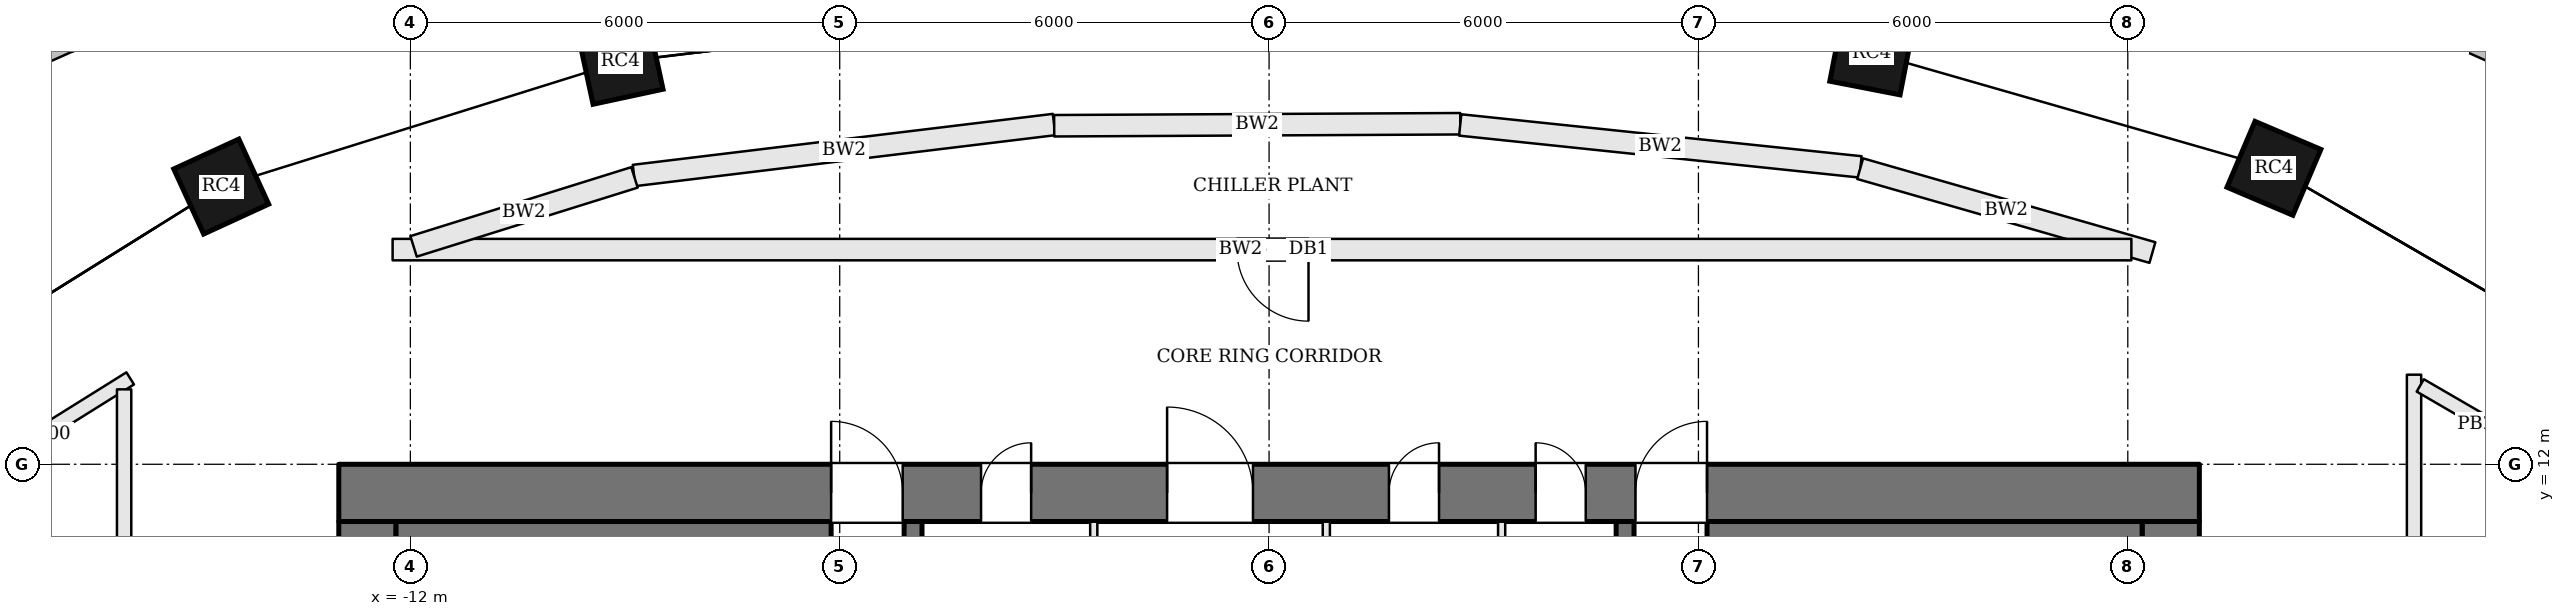
"""IFC4 building model, lengths in metres.
Left out: names, types, materials, properties, quantities, classifications, styles, units other than length and angle.
Written with IfcOpenShell. Run it as: python <this file> out.ifc"""

import sys

from ifc_helpers import new_model, si_unit, direction, frame, frame_2d, origin, origin_2d, place, context, subcontext, project, spatial, rectangle, extrude, element, fill, save


model = new_model("IFC4")
c1 = context("Model", 3, precision=1e-05, world=origin(), true_north=direction((0.0, 1.0)))
c2 = subcontext(c1, "Body", "Model", "MODEL_VIEW")
j1 = project(units=[si_unit("LENGTHUNIT", "METRE"), si_unit("PLANEANGLEUNIT", "RADIAN")], contexts=[c1])
p1 = place(None, origin())
s1 = spatial("IfcSite", under=j1, at=p1, CompositionType="ELEMENT")
p2 = place(p1, origin())
s2 = spatial("IfcBuilding", under=s1, at=p2, CompositionType="ELEMENT")
p3 = place(p2, frame((0.0, 0.0, 216.9)))
s3 = spatial("IfcBuildingStorey", under=s2, at=p3, CompositionType="ELEMENT", Elevation=216.9)
p4 = place(p3, frame((-13.0, 11.6, 0.0), z_axis=(0.0, 0.0, 1.0), x_axis=(1.0, 0.0, 0.0)))
e1 = element("IfcWall", 1, at=p4, inside=s3, PredefinedType="SHEAR", context=c2, shape_type="SweptSolid", body=[
    extrude(rectangle(XDim=26.0, YDim=0.8, at=frame_2d((13.0, 0.0))), origin(), (0.0, 0.0, 1.0), 4.5),
])
p5 = place(p4, frame((8.975, 0.0, 0.0)))
e2 = element("IfcOpeningElement", 2, at=p5, cuts=e1, PredefinedType="OPENING", context=c2, shape_type="SweptSolid", body=[
    extrude(rectangle(XDim=0.7, YDim=2.1, at=frame_2d((0.35, 1.05))), frame((0.0, 0.41, 0.0), z_axis=(0.0, -1.0, 0.0), x_axis=(1.0, 0.0, 0.0)), (0.0, 0.0, 1.0), 0.82),
])
p6 = place(p4, frame((11.575, 0.0, 0.0)))
e3 = element("IfcOpeningElement", 3, at=p6, cuts=e1, PredefinedType="OPENING", context=c2, shape_type="SweptSolid", body=[
    extrude(rectangle(XDim=1.2, YDim=2.1, at=frame_2d((0.6, 1.05))), frame((0.0, 0.41, 0.0), z_axis=(0.0, -1.0, 0.0), x_axis=(1.0, 0.0, 0.0)), (0.0, 0.0, 1.0), 0.82),
])
p7 = place(p4, frame((14.675, 0.0, 0.0)))
e4 = element("IfcOpeningElement", 4, at=p7, cuts=e1, PredefinedType="OPENING", context=c2, shape_type="SweptSolid", body=[
    extrude(rectangle(XDim=0.7, YDim=2.1, at=frame_2d((0.35, 1.05))), frame((0.0, 0.41, 0.0), z_axis=(0.0, -1.0, 0.0), x_axis=(1.0, 0.0, 0.0)), (0.0, 0.0, 1.0), 0.82),
])
p8 = place(p4, frame((16.725, 0.0, 0.0)))
e5 = element("IfcOpeningElement", 5, at=p8, cuts=e1, PredefinedType="OPENING", context=c2, shape_type="SweptSolid", body=[
    extrude(rectangle(XDim=0.7, YDim=2.1, at=frame_2d((0.35, 1.05))), frame((0.0, 0.41, 0.0), z_axis=(0.0, -1.0, 0.0), x_axis=(1.0, 0.0, 0.0)), (0.0, 0.0, 1.0), 0.82),
])
p9 = place(p4, frame((6.88, 0.0, 0.0)))
e6 = element("IfcOpeningElement", 6, at=p9, cuts=e1, PredefinedType="OPENING", context=c2, shape_type="SweptSolid", body=[
    extrude(rectangle(XDim=1.0, YDim=2.1, at=frame_2d((0.5, 1.05))), frame((0.0, 0.41, 0.0), z_axis=(0.0, -1.0, 0.0), x_axis=(1.0, 0.0, 0.0)), (0.0, 0.0, 1.0), 0.82),
])
p10 = place(p4, frame((18.12, 0.0, 0.0)))
e7 = element("IfcOpeningElement", 7, at=p10, cuts=e1, PredefinedType="OPENING", context=c2, shape_type="SweptSolid", body=[
    extrude(rectangle(XDim=1.0, YDim=2.1, at=frame_2d((0.5, 1.05))), frame((0.0, 0.41, 0.0), z_axis=(0.0, -1.0, 0.0), x_axis=(1.0, 0.0, 0.0)), (0.0, 0.0, 1.0), 0.82),
])
p11 = place(p3, frame((12.6, -2.2, 0.0), z_axis=(0.0, 0.0, 1.0), x_axis=(0.0, 1.0, 0.0)))
e8 = element("IfcWall", 8, at=p11, inside=s3, PredefinedType="SHEAR", context=c2, shape_type="SweptSolid", body=[
    extrude(rectangle(XDim=13.4, YDim=0.8, at=frame_2d((6.7, 0.0))), origin(), (0.0, 0.0, 1.0), 4.5),
])
p12 = place(p11, frame((7.4, 0.0, 0.0)))
e9 = element("IfcOpeningElement", 9, at=p12, cuts=e8, PredefinedType="OPENING", context=c2, shape_type="SweptSolid", body=[
    extrude(rectangle(XDim=1.8, YDim=2.1, at=frame_2d((0.9, 1.05))), frame((0.0, 0.41, 0.0), z_axis=(0.0, -1.0, 0.0), x_axis=(1.0, 0.0, 0.0)), (0.0, 0.0, 1.0), 0.82),
])
p13 = place(p3, frame((-12.6, -2.2, 0.0), z_axis=(0.0, 0.0, 1.0), x_axis=(0.0, 1.0, 0.0)))
e10 = element("IfcWall", 10, at=p13, inside=s3, PredefinedType="SHEAR", context=c2, shape_type="SweptSolid", body=[
    extrude(rectangle(XDim=13.4, YDim=0.8, at=frame_2d((6.7, 0.0))), origin(), (0.0, 0.0, 1.0), 4.5),
])
p14 = place(p13, frame((4.2, 0.0, 0.0)))
e11 = element("IfcOpeningElement", 11, at=p14, cuts=e10, PredefinedType="OPENING", context=c2, shape_type="SweptSolid", body=[
    extrude(rectangle(XDim=1.8, YDim=2.1, at=frame_2d((0.9, 1.05))), frame((0.0, 0.41, 0.0), z_axis=(0.0, -1.0, 0.0), x_axis=(1.0, 0.0, 0.0)), (0.0, 0.0, 1.0), 0.82),
])
for number, where, z_axis, x_axis in (
    (12, (14.042, 16.136, 0.0), (0.0, 0.0, 1.0), (-0.92, 0.392, 0.0)),
    (13, (8.422, 17.749, 0.0), (0.0, 0.0, 1.0), (-0.982, 0.191, 0.0)),
    (14, (-9.063, 17.625, 0.0), (0.0, 0.0, 1.0), (-0.978, -0.21, 0.0)),
    (15, (-14.643, 15.881, 0.0), (0.0, 0.0, 1.0), (-0.909, -0.417, 0.0)),
):
    element("IfcColumn", number, at=place(p3, frame(where, z_axis=z_axis, x_axis=x_axis)), inside=s3, PredefinedType="COLUMN", context=c2, shape_type="SweptSolid", body=[
        extrude(rectangle(XDim=1.0, YDim=1.0, at=origin_2d()), origin(), (0.0, 0.0, 1.0), 4.5),
    ])
p15 = place(p3, frame((17.693, 17.58, 0.0), z_axis=(0.0, 0.0, 1.0), x_axis=(-0.912580432801, 0.408897240966, 0.0)))
e16 = element("IfcWall", 16, at=p15, inside=s3, PredefinedType="SOLIDWALL", context=c2, shape_type="SweptSolid", body=[
    extrude(rectangle(XDim=4.021, YDim=0.45, at=frame_2d((2.01, 0.0))), origin(), (0.0, 0.0, 1.0), 4.3),
])
p16 = place(p15, frame((0.96, 0.0, 1.2)))
e17 = element("IfcOpeningElement", 17, at=p16, cuts=e16, PredefinedType="OPENING", context=c2, shape_type="SweptSolid", body=[
    extrude(rectangle(XDim=2.1, YDim=1.8, at=frame_2d((1.05, 0.9))), frame((0.0, 0.235, 0.0), z_axis=(0.0, -1.0, 0.0), x_axis=(1.0, 0.0, 0.0)), (0.0, 0.0, 1.0), 0.47),
])
p17 = place(p3, frame((-14.024, 19.224, 0.0), z_axis=(0.0, 0.0, 1.0), x_axis=(-0.912580432801, -0.408897240966, 0.0)))
e18 = element("IfcWall", 18, at=p17, inside=s3, PredefinedType="SOLIDWALL", context=c2, shape_type="SweptSolid", body=[
    extrude(rectangle(XDim=4.021, YDim=0.45, at=frame_2d((2.01, 0.0))), origin(), (0.0, 0.0, 1.0), 4.3),
])
p18 = place(p17, frame((0.96, 0.0, 1.2)))
e19 = element("IfcOpeningElement", 19, at=p18, cuts=e18, PredefinedType="OPENING", context=c2, shape_type="SweptSolid", body=[
    extrude(rectangle(XDim=2.1, YDim=1.8, at=frame_2d((1.05, 0.9))), frame((0.0, 0.235, 0.0), z_axis=(0.0, -1.0, 0.0), x_axis=(1.0, 0.0, 0.0)), (0.0, 0.0, 1.0), 0.47),
])
p19 = place(p3, frame((-4.975, -2.2, 0.0), z_axis=(0.0, 0.0, 1.0), x_axis=(0.0, 1.0, 0.0)))
e20 = element("IfcWall", 20, at=p19, inside=s3, PredefinedType="SOLIDWALL", context=c2, shape_type="SweptSolid", body=[
    extrude(rectangle(XDim=13.4, YDim=0.25, at=frame_2d((6.7, 0.0))), origin(), (0.0, 0.0, 1.0), 4.3),
])
p20 = place(p19, frame((5.25, 0.0, 0.0)))
e21 = element("IfcOpeningElement", 21, at=p20, cuts=e20, PredefinedType="OPENING", context=c2, shape_type="SweptSolid", body=[
    extrude(rectangle(XDim=1.2, YDim=2.1, at=frame_2d((0.6, 1.05))), frame((0.0, 0.135, 0.0), z_axis=(0.0, -1.0, 0.0), x_axis=(1.0, 0.0, 0.0)), (0.0, 0.0, 1.0), 0.27),
])
p21 = place(p3, frame((4.975, 11.2, 0.0), z_axis=(0.0, 0.0, 1.0), x_axis=(0.0, -1.0, 0.0)))
e22 = element("IfcWall", 22, at=p21, inside=s3, PredefinedType="SOLIDWALL", context=c2, shape_type="SweptSolid", body=[
    extrude(rectangle(XDim=13.4, YDim=0.25, at=frame_2d((6.7, 0.0))), origin(), (0.0, 0.0, 1.0), 4.3),
])
p22 = place(p21, frame((5.25, 0.0, 0.0)))
e23 = element("IfcOpeningElement", 23, at=p22, cuts=e22, PredefinedType="OPENING", context=c2, shape_type="SweptSolid", body=[
    extrude(rectangle(XDim=1.2, YDim=2.1, at=frame_2d((0.6, 1.05))), frame((0.0, 0.135, 0.0), z_axis=(0.0, -1.0, 0.0), x_axis=(1.0, 0.0, 0.0)), (0.0, 0.0, 1.0), 0.27),
])
for number, where, z_axis, x_axis in (
    (24, (-12.2, 10.9, 0.0), (0.0, 0.0, 1.0), (1.0, 0.0, 0.0)),
    (25, (12.2, 10.9, 0.0), (0.0, 0.0, 1.0), (-1.0, 0.0, 0.0)),
):
    element("IfcWall", number, at=place(p3, frame(where, z_axis=z_axis, x_axis=x_axis)), inside=s3, PredefinedType="SOLIDWALL", context=c2, shape_type="SweptSolid", body=[
        extrude(rectangle(XDim=6.08, YDim=0.6, at=frame_2d((3.04, 0.0))), origin(), (0.0, 0.0, 1.0), 4.3),
    ])
for number, where, z_axis, x_axis in (
    (26, (-2.45, 8.6, 0.0), (0.0, 0.0, 1.0), (0.0, 1.0, 0.0)),
    (27, (0.8, 8.6, 0.0), (0.0, 0.0, 1.0), (0.0, 1.0, 0.0)),
    (28, (3.25, 8.6, 0.0), (0.0, 0.0, 1.0), (0.0, 1.0, 0.0)),
):
    element("IfcWall", number, at=place(p3, frame(where, z_axis=z_axis, x_axis=x_axis)), inside=s3, PredefinedType="PARTITIONING", context=c2, shape_type="SweptSolid", body=[
        extrude(rectangle(XDim=2.6, YDim=0.1, at=frame_2d((1.3, 0.0))), origin(), (0.0, 0.0, 1.0), 4.3),
    ])
p23 = place(p3, frame((-18.422, 11.635, 0.0), z_axis=(0.0, 0.0, 1.0), x_axis=(0.848299824463, 0.529516201656, 0.0)))
e29 = element("IfcWall", 29, at=p23, inside=s3, PredefinedType="PARTITIONING", context=c2, shape_type="SweptSolid", body=[
    extrude(rectangle(XDim=2.955, YDim=0.2, at=frame_2d((1.478, 0.0))), origin(), (0.0, 0.0, 1.0), 4.3),
])
p24 = place(p3, frame((-16.0, 13.047, 0.0), z_axis=(0.0, 0.0, 1.0), x_axis=(0.0, -1.0, 0.0)))
e30 = element("IfcWall", 30, at=p24, inside=s3, PredefinedType="PARTITIONING", context=c2, shape_type="SweptSolid", body=[
    extrude(rectangle(XDim=19.147, YDim=0.2, at=frame_2d((9.574, 0.0))), origin(), (0.0, 0.0, 1.0), 4.3),
])
p25 = place(p24, frame((7.647, 0.0, 0.0)))
e31 = element("IfcOpeningElement", 31, at=p25, cuts=e30, PredefinedType="OPENING", context=c2, shape_type="SweptSolid", body=[
    extrude(rectangle(XDim=1.8, YDim=2.1, at=frame_2d((0.9, 1.05))), frame((0.0, 0.11, 0.0), z_axis=(0.0, -1.0, 0.0), x_axis=(1.0, 0.0, 0.0)), (0.0, 0.0, 1.0), 0.22),
])
p26 = place(p3, frame((16.0, -5.9, 0.0), z_axis=(0.0, 0.0, 1.0), x_axis=(0.0, 1.0, 0.0)))
e32 = element("IfcWall", 32, at=p26, inside=s3, PredefinedType="PARTITIONING", context=c2, shape_type="SweptSolid", body=[
    extrude(rectangle(XDim=19.152, YDim=0.2, at=frame_2d((9.576, 0.0))), origin(), (0.0, 0.0, 1.0), 4.3),
])
p27 = place(p26, frame((9.5, 0.0, 0.0)))
e33 = element("IfcOpeningElement", 33, at=p27, cuts=e32, PredefinedType="OPENING", context=c2, shape_type="SweptSolid", body=[
    extrude(rectangle(XDim=1.8, YDim=2.1, at=frame_2d((0.9, 1.05))), frame((0.0, 0.11, 0.0), z_axis=(0.0, -1.0, 0.0), x_axis=(1.0, 0.0, 0.0)), (0.0, 0.0, 1.0), 0.22),
])
p28 = place(p3, frame((16.087, 13.102, 0.0), z_axis=(0.0, 0.0, 1.0), x_axis=(0.864913206024, -0.50192145406, 0.0)))
e34 = element("IfcWall", 34, at=p28, inside=s3, PredefinedType="PARTITIONING", context=c2, shape_type="SweptSolid", body=[
    extrude(rectangle(XDim=2.174, YDim=0.2, at=frame_2d((1.087, 0.0))), origin(), (0.0, 0.0, 1.0), 4.3),
])
p29 = place(p3, frame((-8.874, 16.036, 0.0), z_axis=(0.0, 0.0, 1.0), x_axis=(0.992721072598, 0.120436174046, 0.0)))
e35 = element("IfcWall", 35, at=p29, inside=s3, PredefinedType="SOLIDWALL", context=c2, shape_type="SweptSolid", body=[
    extrude(rectangle(XDim=5.913, YDim=0.3, at=frame_2d((2.957, 0.0))), origin(), (0.0, 0.0, 1.0), 4.3),
])
p30 = place(p3, frame((-3.003, 16.731, 0.0), z_axis=(0.0, 0.0, 1.0), x_axis=(0.999987762334, 0.004947239951, 0.0)))
e36 = element("IfcWall", 36, at=p30, inside=s3, PredefinedType="SOLIDWALL", context=c2, shape_type="SweptSolid", body=[
    extrude(rectangle(XDim=5.675, YDim=0.3, at=frame_2d((2.837, 0.0))), origin(), (0.0, 0.0, 1.0), 4.3),
])
p31 = place(p3, frame((2.671, 16.742, 0.0), z_axis=(0.0, 0.0, 1.0), x_axis=(0.99455907377, -0.104174127222, 0.0)))
e37 = element("IfcWall", 37, at=p31, inside=s3, PredefinedType="SOLIDWALL", context=c2, shape_type="SweptSolid", body=[
    extrude(rectangle(XDim=5.625, YDim=0.3, at=frame_2d((2.812, 0.0))), origin(), (0.0, 0.0, 1.0), 4.3),
])
p32 = place(p3, frame((8.26, 16.131, 0.0), z_axis=(0.0, 0.0, 1.0), x_axis=(0.961195849484, -0.275866886261, 0.0)))
e38 = element("IfcWall", 38, at=p32, inside=s3, PredefinedType="SOLIDWALL", context=c2, shape_type="SweptSolid", body=[
    extrude(rectangle(XDim=4.249, YDim=0.3, at=frame_2d((2.125, 0.0))), origin(), (0.0, 0.0, 1.0), 4.3),
])
p33 = place(p3, frame((12.05, 15.0, 0.0), z_axis=(0.0, 0.0, 1.0), x_axis=(-1.0, 0.0, 0.0)))
e39 = element("IfcWall", 39, at=p33, inside=s3, PredefinedType="SOLIDWALL", context=c2, shape_type="SweptSolid", body=[
    extrude(rectangle(XDim=24.298, YDim=0.3, at=frame_2d((12.149, 0.0))), origin(), (0.0, 0.0, 1.0), 4.3),
])
p34 = place(p33, frame((11.499, 0.0, 0.0)))
e40 = element("IfcOpeningElement", 40, at=p34, cuts=e39, PredefinedType="OPENING", context=c2, shape_type="SweptSolid", body=[
    extrude(rectangle(XDim=1.0, YDim=2.1, at=frame_2d((0.5, 1.05))), frame((0.0, 0.16, 0.0), z_axis=(0.0, -1.0, 0.0), x_axis=(1.0, 0.0, 0.0)), (0.0, 0.0, 1.0), 0.32),
])
p35 = place(p3, frame((-11.955, 15.045, 0.0), z_axis=(0.0, 0.0, 1.0), x_axis=(0.954535032464, 0.298098761819, 0.0)))
e41 = element("IfcWall", 41, at=p35, inside=s3, PredefinedType="SOLIDWALL", context=c2, shape_type="SweptSolid", body=[
    extrude(rectangle(XDim=3.234, YDim=0.3, at=frame_2d((1.617, 0.0))), origin(), (0.0, 0.0, 1.0), 4.3),
])
p36 = place(p5, origin())
e42 = element("IfcDoor", 42, at=p36, inside=s3, OperationType="SINGLE_SWING_RIGHT", PredefinedType="DOOR", context=c2, shape_type="SweptSolid", body=[
    extrude(rectangle(XDim=0.7, YDim=2.1, at=frame_2d((0.35, 1.05))), frame((0.0, 0.025, 0.0), z_axis=(0.0, -1.0, 0.0), x_axis=(1.0, 0.0, 0.0)), (0.0, 0.0, 1.0), 0.05),
])
fill(e2, e42)
p37 = place(p6, origin())
e43 = element("IfcDoor", 43, at=p37, inside=s3, OperationType="SINGLE_SWING_LEFT", PredefinedType="DOOR", context=c2, shape_type="SweptSolid", body=[
    extrude(rectangle(XDim=1.2, YDim=2.1, at=frame_2d((0.6, 1.05))), frame((0.0, 0.025, 0.0), z_axis=(0.0, -1.0, 0.0), x_axis=(1.0, 0.0, 0.0)), (0.0, 0.0, 1.0), 0.05),
])
fill(e3, e43)
p38 = place(p7, origin())
e44 = element("IfcDoor", 44, at=p38, inside=s3, OperationType="SINGLE_SWING_RIGHT", PredefinedType="DOOR", context=c2, shape_type="SweptSolid", body=[
    extrude(rectangle(XDim=0.7, YDim=2.1, at=frame_2d((0.35, 1.05))), frame((0.0, 0.025, 0.0), z_axis=(0.0, -1.0, 0.0), x_axis=(1.0, 0.0, 0.0)), (0.0, 0.0, 1.0), 0.05),
])
fill(e4, e44)
p39 = place(p8, origin())
e45 = element("IfcDoor", 45, at=p39, inside=s3, OperationType="SINGLE_SWING_LEFT", PredefinedType="DOOR", context=c2, shape_type="SweptSolid", body=[
    extrude(rectangle(XDim=0.7, YDim=2.1, at=frame_2d((0.35, 1.05))), frame((0.0, 0.025, 0.0), z_axis=(0.0, -1.0, 0.0), x_axis=(1.0, 0.0, 0.0)), (0.0, 0.0, 1.0), 0.05),
])
fill(e5, e45)
p40 = place(p9, origin())
e46 = element("IfcDoor", 46, at=p40, inside=s3, OperationType="SINGLE_SWING_LEFT", PredefinedType="DOOR", context=c2, shape_type="SweptSolid", body=[
    extrude(rectangle(XDim=1.0, YDim=2.1, at=frame_2d((0.5, 1.05))), frame((0.0, 0.025, 0.0), z_axis=(0.0, -1.0, 0.0), x_axis=(1.0, 0.0, 0.0)), (0.0, 0.0, 1.0), 0.05),
])
fill(e6, e46)
p41 = place(p10, origin())
e47 = element("IfcDoor", 47, at=p41, inside=s3, OperationType="SINGLE_SWING_RIGHT", PredefinedType="DOOR", context=c2, shape_type="SweptSolid", body=[
    extrude(rectangle(XDim=1.0, YDim=2.1, at=frame_2d((0.5, 1.05))), frame((0.0, 0.025, 0.0), z_axis=(0.0, -1.0, 0.0), x_axis=(1.0, 0.0, 0.0)), (0.0, 0.0, 1.0), 0.05),
])
fill(e7, e47)
p42 = place(p34, origin())
e48 = element("IfcDoor", 48, at=p42, inside=s3, OperationType="SINGLE_SWING_LEFT", PredefinedType="DOOR", context=c2, shape_type="SweptSolid", body=[
    extrude(rectangle(XDim=1.0, YDim=2.1, at=frame_2d((0.5, 1.05))), frame((0.0, 0.025, 0.0), z_axis=(0.0, -1.0, 0.0), x_axis=(1.0, 0.0, 0.0)), (0.0, 0.0, 1.0), 0.05),
])
fill(e40, e48)
save(model, sys.argv[1])
